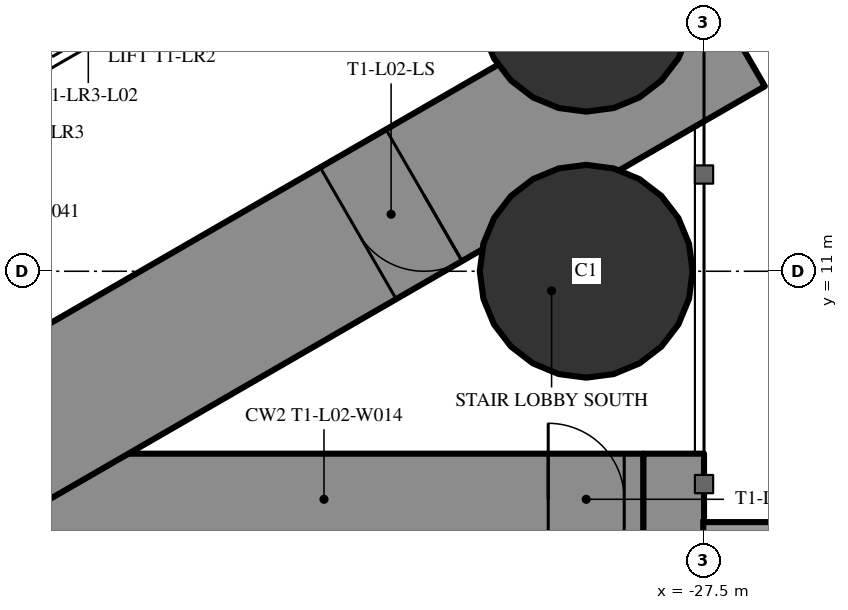
"""IFC4 building model, lengths in metres.
Left out: names, types, materials, properties, quantities, classifications, styles, units other than length and angle.
Written with IfcOpenShell. Run it as: python <this file> out.ifc"""

import sys

from ifc_helpers import new_model, si_unit, direction, frame, frame_2d, origin, origin_2d, place, context, subcontext, project, spatial, rectangle, hollow_circle, extrude, element, fill, save


model = new_model("IFC4")
c1 = context("Model", 3, precision=1e-05, world=origin(), true_north=direction((0.0, 1.0)))
c2 = subcontext(c1, "Body", "Model", "MODEL_VIEW")
j1 = project(units=[si_unit("LENGTHUNIT", "METRE"), si_unit("PLANEANGLEUNIT", "RADIAN")], contexts=[c1])
p1 = place(None, origin())
s1 = spatial("IfcSite", under=j1, at=p1, CompositionType="ELEMENT")
p2 = place(p1, origin())
s2 = spatial("IfcBuilding", under=s1, at=p2, CompositionType="ELEMENT")
p3 = place(p2, frame((0.0, 0.0, 12.6)))
s3 = spatial("IfcBuildingStorey", under=s2, at=p3, CompositionType="ELEMENT", Elevation=12.6)
for number, where, z_axis, x_axis in (
    (1, (-29.05, 11.0, 0.0), (0.0, 0.0, 1.0), (1.0, 0.0, 0.0)),
    (2, (-29.05, 14.5, 0.0), (0.0, 0.0, 1.0), (1.0, 0.0, 0.0)),
):
    element("IfcColumn", number, at=place(p3, frame(where, z_axis=z_axis, x_axis=x_axis)), inside=s3, PredefinedType="COLUMN", context=c2, shape_type="SweptSolid", body=[
        extrude(hollow_circle(Radius=1.4, WallThickness=0.12, at=origin_2d()), origin(), (0.0, 0.0, 1.0), 5.4),
    ])
p4 = place(p3, frame((-27.9, 8.6, 0.0), z_axis=(0.0, 0.0, 1.0), x_axis=(0.0, -1.0, 0.0)))
e3 = element("IfcWall", 3, at=p4, inside=s3, PredefinedType="SHEAR", context=c2, shape_type="SweptSolid", body=[
    extrude(rectangle(XDim=17.2, YDim=0.8, at=frame_2d((8.6, 0.0))), origin(), (0.0, 0.0, 1.0), 5.4),
])
p5 = place(p4, frame((7.2, 0.0, 0.0)))
e4 = element("IfcOpeningElement", 4, at=p5, cuts=e3, PredefinedType="OPENING", context=c2, shape_type="SweptSolid", body=[
    extrude(rectangle(XDim=1.0, YDim=2.2, at=frame_2d((0.5, 1.1))), frame((0.0, 0.41, 0.0), z_axis=(0.0, -1.0, 0.0), x_axis=(1.0, 0.0, 0.0)), (0.0, 0.0, 1.0), 0.82),
])
p6 = place(p4, frame((2.45, 0.0, 0.6)))
e5 = element("IfcOpeningElement", 5, at=p6, cuts=e3, PredefinedType="OPENING", context=c2, shape_type="SweptSolid", body=[
    extrude(rectangle(XDim=0.6, YDim=3.9, at=frame_2d((0.3, 1.95))), frame((0.0, 0.41, 0.0), z_axis=(0.0, -1.0, 0.0), x_axis=(1.0, 0.0, 0.0)), (0.0, 0.0, 1.0), 0.82),
])
p7 = place(p4, frame((14.15, 0.0, 0.6)))
e6 = element("IfcOpeningElement", 6, at=p7, cuts=e3, PredefinedType="OPENING", context=c2, shape_type="SweptSolid", body=[
    extrude(rectangle(XDim=0.6, YDim=3.9, at=frame_2d((0.3, 1.95))), frame((0.0, 0.41, 0.0), z_axis=(0.0, -1.0, 0.0), x_axis=(1.0, 0.0, 0.0)), (0.0, 0.0, 1.0), 0.82),
])
p8 = place(p3, frame((-28.3, 8.0, 0.0), z_axis=(0.0, 0.0, 1.0), x_axis=(-1.0, 0.0, 0.0)))
e7 = element("IfcWall", 7, at=p8, inside=s3, PredefinedType="SHEAR", context=c2, shape_type="SweptSolid", body=[
    extrude(rectangle(XDim=8.4, YDim=1.2, at=frame_2d((4.2, 0.0))), origin(), (0.0, 0.0, 1.0), 5.4),
])
p9 = place(p8, frame((0.25, 0.0, 0.0)))
e8 = element("IfcOpeningElement", 8, at=p9, cuts=e7, PredefinedType="OPENING", context=c2, shape_type="SweptSolid", body=[
    extrude(rectangle(XDim=1.0, YDim=2.2, at=frame_2d((0.5, 1.1))), frame((0.0, 0.61, 0.0), z_axis=(0.0, -1.0, 0.0), x_axis=(1.0, 0.0, 0.0)), (0.0, 0.0, 1.0), 1.22),
])
p10 = place(p3, frame((-27.2, 14.3, 0.0), z_axis=(0.0, 0.0, 1.0), x_axis=(-0.866026593062, -0.499997940104, 0.0)))
e9 = element("IfcWall", 9, at=p10, inside=s3, PredefinedType="SHEAR", context=c2, shape_type="SweptSolid", body=[
    extrude(rectangle(XDim=28.946, YDim=2.0, at=frame_2d((14.473, 0.0))), origin(), (0.0, 0.0, 1.0), 5.4),
])
p11 = place(p10, frame((4.6, 0.0, 0.0)))
e10 = element("IfcOpeningElement", 10, at=p11, cuts=e9, PredefinedType="OPENING", context=c2, shape_type="SweptSolid", body=[
    extrude(rectangle(XDim=1.0, YDim=2.2, at=frame_2d((0.5, 1.1))), frame((0.0, 1.01, 0.0), z_axis=(0.0, -1.0, 0.0), x_axis=(1.0, 0.0, 0.0)), (0.0, 0.0, 1.0), 2.02),
])
p12 = place(p10, frame((13.395, 0.0, 0.0)))
e11 = element("IfcOpeningElement", 11, at=p12, cuts=e9, PredefinedType="OPENING", context=c2, shape_type="SweptSolid", body=[
    extrude(rectangle(XDim=1.8, YDim=2.2, at=frame_2d((0.9, 1.1))), frame((0.0, 1.01, 0.0), z_axis=(0.0, -1.0, 0.0), x_axis=(1.0, 0.0, 0.0)), (0.0, 0.0, 1.0), 2.02),
])
p13 = place(p3, frame((-31.01, 16.747, 0.0), z_axis=(0.0, 0.0, 1.0), x_axis=(-0.866028165386, -0.499995216735, 0.0)))
e12 = element("IfcWall", 12, at=p13, inside=s3, PredefinedType="PARTITIONING", context=c2, shape_type="SweptSolid", body=[
    extrude(rectangle(XDim=8.6, YDim=0.25, at=frame_2d((4.3, 0.0))), origin(), (0.0, 0.0, 1.0), 5.15),
])
p14 = place(p13, frame((0.75, 0.0, 0.0)))
e13 = element("IfcOpeningElement", 13, at=p14, cuts=e12, PredefinedType="OPENING", context=c2, shape_type="SweptSolid", body=[
    extrude(rectangle(XDim=1.1, YDim=2.2, at=frame_2d((0.55, 1.1))), frame((0.0, 0.135, 0.0), z_axis=(0.0, -1.0, 0.0), x_axis=(1.0, 0.0, 0.0)), (0.0, 0.0, 1.0), 0.27),
])
p15 = place(p13, frame((2.75, 0.0, 0.0)))
e14 = element("IfcOpeningElement", 14, at=p15, cuts=e12, PredefinedType="OPENING", context=c2, shape_type="SweptSolid", body=[
    extrude(rectangle(XDim=1.1, YDim=2.2, at=frame_2d((0.55, 1.1))), frame((0.0, 0.135, 0.0), z_axis=(0.0, -1.0, 0.0), x_axis=(1.0, 0.0, 0.0)), (0.0, 0.0, 1.0), 0.27),
])
p16 = place(p13, frame((4.75, 0.0, 0.0)))
e15 = element("IfcOpeningElement", 15, at=p16, cuts=e12, PredefinedType="OPENING", context=c2, shape_type="SweptSolid", body=[
    extrude(rectangle(XDim=1.1, YDim=2.2, at=frame_2d((0.55, 1.1))), frame((0.0, 0.135, 0.0), z_axis=(0.0, -1.0, 0.0), x_axis=(1.0, 0.0, 0.0)), (0.0, 0.0, 1.0), 0.27),
])
p17 = place(p13, frame((6.75, 0.0, 0.0)))
e16 = element("IfcOpeningElement", 16, at=p17, cuts=e12, PredefinedType="OPENING", context=c2, shape_type="SweptSolid", body=[
    extrude(rectangle(XDim=1.1, YDim=2.2, at=frame_2d((0.55, 1.1))), frame((0.0, 0.135, 0.0), z_axis=(0.0, -1.0, 0.0), x_axis=(1.0, 0.0, 0.0)), (0.0, 0.0, 1.0), 0.27),
])
p18 = place(p11, origin())
e17 = element("IfcDoor", 17, at=p18, inside=s3, OperationType="SINGLE_SWING_LEFT", PredefinedType="DOOR", context=c2, shape_type="SweptSolid", body=[
    extrude(rectangle(XDim=1.0, YDim=2.2, at=frame_2d((0.5, 1.1))), frame((0.0, 0.025, 0.0), z_axis=(0.0, -1.0, 0.0), x_axis=(1.0, 0.0, 0.0)), (0.0, 0.0, 1.0), 0.05),
])
fill(e10, e17)
p19 = place(p9, origin())
e18 = element("IfcDoor", 18, at=p19, inside=s3, OperationType="SINGLE_SWING_RIGHT", PredefinedType="DOOR", context=c2, shape_type="SweptSolid", body=[
    extrude(rectangle(XDim=1.0, YDim=2.2, at=frame_2d((0.5, 1.1))), frame((0.0, 0.025, 0.0), z_axis=(0.0, -1.0, 0.0), x_axis=(1.0, 0.0, 0.0)), (0.0, 0.0, 1.0), 0.05),
])
fill(e8, e18)
p20 = place(p16, origin())
e19 = element("IfcDoor", 19, at=p20, inside=s3, OperationType="DOUBLE_DOOR_SLIDING", PredefinedType="USERDEFINED", context=c2, shape_type="SweptSolid", body=[
    extrude(rectangle(XDim=1.1, YDim=2.2, at=frame_2d((0.55, 1.1))), frame((0.0, 0.025, 0.0), z_axis=(0.0, -1.0, 0.0), x_axis=(1.0, 0.0, 0.0)), (0.0, 0.0, 1.0), 0.05),
])
fill(e15, e19)
save(model, sys.argv[1])
